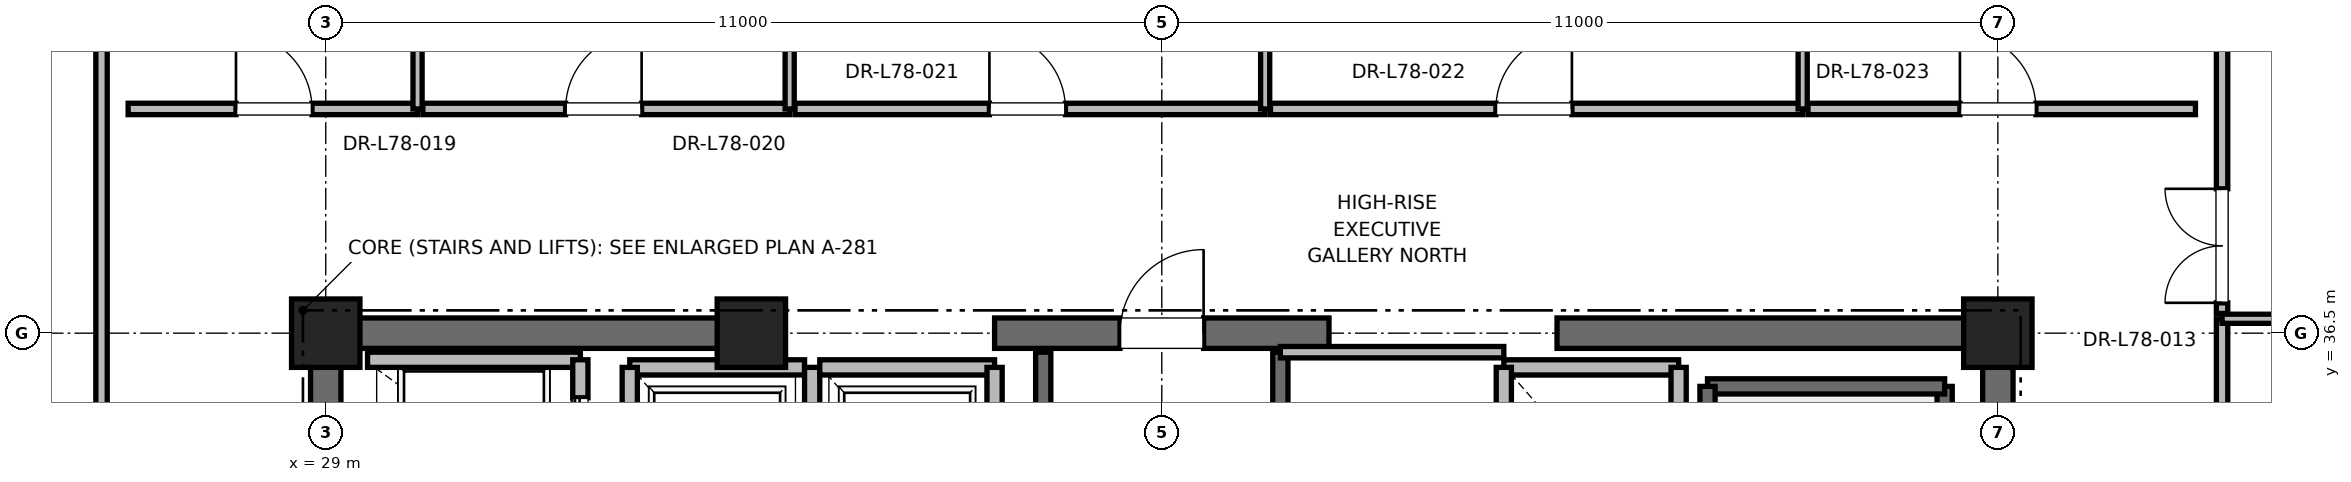
"""IFC4 building model, lengths in metres.
Left out: names, types, materials, properties, quantities, classifications, styles, units other than length and angle.
Written with IfcOpenShell. Run it as: python <this file> out.ifc"""

import sys

from ifc_helpers import new_model, si_unit, direction, frame, frame_2d, origin, origin_2d, place, context, subcontext, project, spatial, rectangle, extrude, element, fill, save


model = new_model("IFC4")
c1 = context("Model", 3, precision=1e-05, world=origin(), true_north=direction((0.0, 1.0)))
c2 = subcontext(c1, "Body", "Model", "MODEL_VIEW")
j1 = project(units=[si_unit("LENGTHUNIT", "METRE"), si_unit("PLANEANGLEUNIT", "RADIAN")], contexts=[c1])
p1 = place(None, origin())
s1 = spatial("IfcSite", under=j1, at=p1, CompositionType="ELEMENT")
p2 = place(p1, origin())
s2 = spatial("IfcBuilding", under=s1, at=p2, CompositionType="ELEMENT")
p3 = place(p2, frame((0.0, 0.0, 334.8)))
s3 = spatial("IfcBuildingStorey", under=s2, at=p3, CompositionType="ELEMENT", Elevation=334.8)
for number, where, z_axis, x_axis in (
    (1, (29.0, 36.5, 0.0), (0.0, 0.0, 1.0), (1.0, 0.0, 0.0)),
    (2, (51.0, 36.5, 0.0), (0.0, 0.0, 1.0), (1.0, 0.0, 0.0)),
    (3, (34.6, 36.5, 0.0), (0.0, 0.0, 1.0), (1.0, 0.0, 0.0)),
):
    element("IfcColumn", number, at=place(p3, frame(where, z_axis=z_axis, x_axis=x_axis)), inside=s3, PredefinedType="PILASTER", context=c2, shape_type="SweptSolid", body=[
        extrude(rectangle(XDim=0.9, YDim=0.9, at=origin_2d()), origin(), (0.0, 0.0, 1.0), 4.0),
    ])
p4 = place(p3, frame((29.0, 36.5, 0.0), z_axis=(0.0, 0.0, 1.0), x_axis=(1.0, 0.0, 0.0)))
e4 = element("IfcWall", 4, at=p4, inside=s3, PredefinedType="SHEAR", context=c2, shape_type="SweptSolid", body=[
    extrude(rectangle(XDim=5.8, YDim=0.4, at=frame_2d((2.9, 0.0))), origin(), (0.0, 0.0, 1.0), 3.785),
])
p5 = place(p3, frame((37.8, 36.5, 0.0), z_axis=(0.0, 0.0, 1.0), x_axis=(1.0, 0.0, 0.0)))
e5 = element("IfcWall", 5, at=p5, inside=s3, PredefinedType="SHEAR", context=c2, shape_type="SweptSolid", body=[
    extrude(rectangle(XDim=4.4, YDim=0.4, at=frame_2d((2.2, 0.0))), origin(), (0.0, 0.0, 1.0), 3.785),
])
p6 = place(p5, frame((1.65, 0.0, 0.0)))
e6 = element("IfcOpeningElement", 6, at=p6, cuts=e5, PredefinedType="OPENING", context=c2, shape_type="SweptSolid", body=[
    extrude(rectangle(XDim=1.1, YDim=2.15, at=frame_2d((0.55, 1.075))), frame((0.0, 0.2, 0.0), z_axis=(0.0, -1.0, 0.0), x_axis=(1.0, 0.0, 0.0)), (0.0, 0.0, 1.0), 0.4),
])
for number, where, z_axis, x_axis in (
    (7, (45.2, 36.5, 0.0), (0.0, 0.0, 1.0), (1.0, 0.0, 0.0)),
    (8, (29.0, 30.7, 0.0), (0.0, 0.0, 1.0), (0.0, 1.0, 0.0)),
):
    element("IfcWall", number, at=place(p3, frame(where, z_axis=z_axis, x_axis=x_axis)), inside=s3, PredefinedType="SHEAR", context=c2, shape_type="SweptSolid", body=[
        extrude(rectangle(XDim=5.8, YDim=0.4, at=frame_2d((2.9, 0.0))), origin(), (0.0, 0.0, 1.0), 3.785),
    ])
p7 = place(p3, frame((51.0, 27.7, 0.0), z_axis=(0.0, 0.0, 1.0), x_axis=(0.0, 1.0, 0.0)))
e9 = element("IfcWall", 9, at=p7, inside=s3, PredefinedType="SHEAR", context=c2, shape_type="SweptSolid", body=[
    extrude(rectangle(XDim=8.8, YDim=0.4, at=frame_2d((4.4, 0.0))), origin(), (0.0, 0.0, 1.0), 3.785),
])
p8 = place(p3, frame((50.3, 27.65, 0.0), z_axis=(0.0, 0.0, 1.0), x_axis=(0.0, 1.0, 0.0)))
e10 = element("IfcWall", 10, at=p8, inside=s3, PredefinedType="SOLIDWALL", context=c2, shape_type="SweptSolid", body=[
    extrude(rectangle(XDim=8.15, YDim=0.2, at=frame_2d((4.075, 0.0))), origin(), (0.0, 0.0, 1.0), 3.785),
])
p9 = place(p3, frame((47.18, 35.8, 0.0), z_axis=(0.0, 0.0, 1.0), x_axis=(1.0, 0.0, 0.0)))
e11 = element("IfcWall", 11, at=p9, inside=s3, PredefinedType="SOLIDWALL", context=c2, shape_type="SweptSolid", body=[
    extrude(rectangle(XDim=3.12, YDim=0.2, at=frame_2d((1.56, 0.0))), origin(), (0.0, 0.0, 1.0), 3.785),
])
p10 = place(p3, frame((47.18, 27.62, 0.0), z_axis=(0.0, 0.0, 1.0), x_axis=(0.0, 1.0, 0.0)))
e12 = element("IfcWall", 12, at=p10, inside=s3, PredefinedType="SOLIDWALL", context=c2, shape_type="SweptSolid", body=[
    extrude(rectangle(XDim=8.18, YDim=0.2, at=frame_2d((4.09, 0.0))), origin(), (0.0, 0.0, 1.0), 3.785),
])
p11 = place(p3, frame((38.44, 27.38, 0.0), z_axis=(0.0, 0.0, 1.0), x_axis=(0.0, 1.0, 0.0)))
e13 = element("IfcWall", 13, at=p11, inside=s3, PredefinedType="SOLIDWALL", context=c2, shape_type="SweptSolid", body=[
    extrude(rectangle(XDim=8.87, YDim=0.2, at=frame_2d((4.435, 0.0))), origin(), (0.0, 0.0, 1.0), 3.785),
])
p12 = place(p3, frame((41.56, 27.68, 0.0), z_axis=(0.0, 0.0, 1.0), x_axis=(0.0, 1.0, 0.0)))
e14 = element("IfcWall", 14, at=p12, inside=s3, PredefinedType="SOLIDWALL", context=c2, shape_type="SweptSolid", body=[
    extrude(rectangle(XDim=8.57, YDim=0.2, at=frame_2d((4.285, 0.0))), origin(), (0.0, 0.0, 1.0), 3.785),
])
p13 = place(p3, frame((32.35, 36.15, 0.0), z_axis=(0.0, 0.0, 1.0), x_axis=(-1.0, 0.0, 0.0)))
e15 = element("IfcWall", 15, at=p13, inside=s3, PredefinedType="SOLIDWALL", context=c2, shape_type="SweptSolid", body=[
    extrude(rectangle(XDim=2.8, YDim=0.2, at=frame_2d((1.4, 0.0))), origin(), (0.0, 0.0, 1.0), 3.22),
])
p14 = place(p3, frame((32.35, 34.05, 0.0), z_axis=(0.0, 0.0, 1.0), x_axis=(0.0, 1.0, 0.0)))
e16 = element("IfcWall", 16, at=p14, inside=s3, PredefinedType="SOLIDWALL", context=c2, shape_type="SweptSolid", body=[
    extrude(rectangle(XDim=2.1, YDim=0.2, at=frame_2d((1.05, 0.0))), origin(), (0.0, 0.0, 1.0), 3.785),
])
p15 = place(p14, frame((0.5, 0.0, 0.0)))
e17 = element("IfcOpeningElement", 17, at=p15, cuts=e16, PredefinedType="OPENING", context=c2, shape_type="SweptSolid", body=[
    extrude(rectangle(XDim=1.1, YDim=2.2, at=frame_2d((0.55, 1.1))), frame((0.0, 0.1, 0.0), z_axis=(0.0, -1.0, 0.0), x_axis=(1.0, 0.0, 0.0)), (0.0, 0.0, 1.0), 0.2),
])
p16 = place(p3, frame((35.3, 36.05, 0.0), z_axis=(0.0, 0.0, 1.0), x_axis=(-1.0, 0.0, 0.0)))
e18 = element("IfcWall", 18, at=p16, inside=s3, PredefinedType="SOLIDWALL", context=c2, shape_type="SweptSolid", body=[
    extrude(rectangle(XDim=2.3, YDim=0.2, at=frame_2d((1.15, 0.0))), origin(), (0.0, 0.0, 1.0), 2.865),
])
p17 = place(p3, frame((33.0, 36.05, 0.0), z_axis=(0.0, 0.0, 1.0), x_axis=(0.0, -1.0, 0.0)))
e19 = element("IfcWall", 19, at=p17, inside=s3, PredefinedType="SOLIDWALL", context=c2, shape_type="SweptSolid", body=[
    extrude(rectangle(XDim=2.6, YDim=0.2, at=frame_2d((1.3, 0.0))), origin(), (0.0, 0.0, 1.0), 3.785),
])
p18 = place(p3, frame((35.4, 33.45, 0.0), z_axis=(0.0, 0.0, 1.0), x_axis=(0.0, 1.0, 0.0)))
e20 = element("IfcWall", 20, at=p18, inside=s3, PredefinedType="SOLIDWALL", context=c2, shape_type="SweptSolid", body=[
    extrude(rectangle(XDim=2.6, YDim=0.2, at=frame_2d((1.3, 0.0))), origin(), (0.0, 0.0, 1.0), 2.865),
])
p19 = place(p3, frame((37.8, 36.05, 0.0), z_axis=(0.0, 0.0, 1.0), x_axis=(-1.0, 0.0, 0.0)))
e21 = element("IfcWall", 21, at=p19, inside=s3, PredefinedType="SOLIDWALL", context=c2, shape_type="SweptSolid", body=[
    extrude(rectangle(XDim=2.3, YDim=0.2, at=frame_2d((1.15, 0.0))), origin(), (0.0, 0.0, 1.0), 2.865),
])
p20 = place(p3, frame((37.8, 33.45, 0.0), z_axis=(0.0, 0.0, 1.0), x_axis=(0.0, 1.0, 0.0)))
e22 = element("IfcWall", 22, at=p20, inside=s3, PredefinedType="SOLIDWALL", context=c2, shape_type="SweptSolid", body=[
    extrude(rectangle(XDim=2.6, YDim=0.2, at=frame_2d((1.3, 0.0))), origin(), (0.0, 0.0, 1.0), 2.865),
])
p21 = place(p3, frame((46.8, 36.05, 0.0), z_axis=(0.0, 0.0, 1.0), x_axis=(-1.0, 0.0, 0.0)))
e23 = element("IfcWall", 23, at=p21, inside=s3, PredefinedType="SOLIDWALL", context=c2, shape_type="SweptSolid", body=[
    extrude(rectangle(XDim=2.3, YDim=0.2, at=frame_2d((1.15, 0.0))), origin(), (0.0, 0.0, 1.0), 2.865),
])
p22 = place(p3, frame((44.5, 36.05, 0.0), z_axis=(0.0, 0.0, 1.0), x_axis=(0.0, -1.0, 0.0)))
e24 = element("IfcWall", 24, at=p22, inside=s3, PredefinedType="SOLIDWALL", context=c2, shape_type="SweptSolid", body=[
    extrude(rectangle(XDim=2.6, YDim=0.2, at=frame_2d((1.3, 0.0))), origin(), (0.0, 0.0, 1.0), 2.865),
])
p23 = place(p3, frame((46.8, 33.45, 0.0), z_axis=(0.0, 0.0, 1.0), x_axis=(0.0, 1.0, 0.0)))
e25 = element("IfcWall", 25, at=p23, inside=s3, PredefinedType="SOLIDWALL", context=c2, shape_type="SweptSolid", body=[
    extrude(rectangle(XDim=2.6, YDim=0.2, at=frame_2d((1.3, 0.0))), origin(), (0.0, 0.0, 1.0), 3.785),
])
p24 = place(p3, frame((41.56, 36.25, 0.0), z_axis=(0.0, 0.0, 1.0), x_axis=(1.0, 0.0, 0.0)))
e26 = element("IfcWall", 26, at=p24, inside=s3, PredefinedType="PARTITIONING", context=c2, shape_type="SweptSolid", body=[
    extrude(rectangle(XDim=2.94, YDim=0.15, at=frame_2d((1.47, 0.0))), origin(), (0.0, 0.0, 1.0), 2.85),
])
p25 = place(p3, frame((26.4, 39.45, 0.0), z_axis=(0.0, 0.0, 1.0), x_axis=(1.0, 0.0, 0.0)))
e27 = element("IfcWall", 27, at=p25, inside=s3, PredefinedType="PARTITIONING", context=c2, shape_type="SweptSolid", body=[
    extrude(rectangle(XDim=3.808, YDim=0.15, at=frame_2d((1.904, 0.0))), origin(), (0.0, 0.0, 1.0), 2.85),
])
p26 = place(p25, frame((1.419, 0.0, 0.0)))
e28 = element("IfcOpeningElement", 28, at=p26, cuts=e27, PredefinedType="OPENING", context=c2, shape_type="SweptSolid", body=[
    extrude(rectangle(XDim=1.0, YDim=2.15, at=frame_2d((0.5, 1.075))), frame((0.0, 0.075, 0.0), z_axis=(0.0, -1.0, 0.0), x_axis=(1.0, 0.0, 0.0)), (0.0, 0.0, 1.0), 0.15),
])
p27 = place(p3, frame((30.208, 39.45, 0.0), z_axis=(0.0, 0.0, 1.0), x_axis=(0.0, 1.0, 0.0)))
e29 = element("IfcWall", 29, at=p27, inside=s3, PredefinedType="PARTITIONING", context=c2, shape_type="SweptSolid", body=[
    extrude(rectangle(XDim=9.322, YDim=0.12, at=frame_2d((4.661, 0.0))), origin(), (0.0, 0.0, 1.0), 2.415),
])
p28 = place(p3, frame((30.278, 39.45, 0.0), z_axis=(0.0, 0.0, 1.0), x_axis=(1.0, 0.0, 0.0)))
e30 = element("IfcWall", 30, at=p28, inside=s3, PredefinedType="PARTITIONING", context=c2, shape_type="SweptSolid", body=[
    extrude(rectangle(XDim=4.826, YDim=0.15, at=frame_2d((2.413, 0.0))), origin(), (0.0, 0.0, 1.0), 2.85),
])
p29 = place(p28, frame((1.878, 0.0, 0.0)))
e31 = element("IfcOpeningElement", 31, at=p29, cuts=e30, PredefinedType="OPENING", context=c2, shape_type="SweptSolid", body=[
    extrude(rectangle(XDim=1.0, YDim=2.15, at=frame_2d((0.5, 1.075))), frame((0.0, 0.075, 0.0), z_axis=(0.0, -1.0, 0.0), x_axis=(1.0, 0.0, 0.0)), (0.0, 0.0, 1.0), 0.15),
])
p30 = place(p3, frame((35.104, 39.45, 0.0), z_axis=(0.0, 0.0, 1.0), x_axis=(0.0, 1.0, 0.0)))
e32 = element("IfcWall", 32, at=p30, inside=s3, PredefinedType="PARTITIONING", context=c2, shape_type="SweptSolid", body=[
    extrude(rectangle(XDim=9.322, YDim=0.12, at=frame_2d((4.661, 0.0))), origin(), (0.0, 0.0, 1.0), 2.415),
])
p31 = place(p3, frame((35.174, 39.45, 0.0), z_axis=(0.0, 0.0, 1.0), x_axis=(1.0, 0.0, 0.0)))
e33 = element("IfcWall", 33, at=p31, inside=s3, PredefinedType="PARTITIONING", context=c2, shape_type="SweptSolid", body=[
    extrude(rectangle(XDim=6.186, YDim=0.15, at=frame_2d((3.093, 0.0))), origin(), (0.0, 0.0, 1.0), 2.85),
])
p32 = place(p31, frame((2.558, 0.0, 0.0)))
e34 = element("IfcOpeningElement", 34, at=p32, cuts=e33, PredefinedType="OPENING", context=c2, shape_type="SweptSolid", body=[
    extrude(rectangle(XDim=1.0, YDim=2.15, at=frame_2d((0.5, 1.075))), frame((0.0, 0.075, 0.0), z_axis=(0.0, -1.0, 0.0), x_axis=(1.0, 0.0, 0.0)), (0.0, 0.0, 1.0), 0.15),
])
p33 = place(p3, frame((41.36, 39.45, 0.0), z_axis=(0.0, 0.0, 1.0), x_axis=(0.0, 1.0, 0.0)))
e35 = element("IfcWall", 35, at=p33, inside=s3, PredefinedType="PARTITIONING", context=c2, shape_type="SweptSolid", body=[
    extrude(rectangle(XDim=9.322, YDim=0.12, at=frame_2d((4.661, 0.0))), origin(), (0.0, 0.0, 1.0), 2.415),
])
p34 = place(p3, frame((41.43, 39.45, 0.0), z_axis=(0.0, 0.0, 1.0), x_axis=(1.0, 0.0, 0.0)))
e36 = element("IfcWall", 36, at=p34, inside=s3, PredefinedType="PARTITIONING", context=c2, shape_type="SweptSolid", body=[
    extrude(rectangle(XDim=7.002, YDim=0.15, at=frame_2d((3.501, 0.0))), origin(), (0.0, 0.0, 1.0), 2.85),
])
p35 = place(p34, frame((2.966, 0.0, 0.0)))
e37 = element("IfcOpeningElement", 37, at=p35, cuts=e36, PredefinedType="OPENING", context=c2, shape_type="SweptSolid", body=[
    extrude(rectangle(XDim=1.0, YDim=2.15, at=frame_2d((0.5, 1.075))), frame((0.0, 0.075, 0.0), z_axis=(0.0, -1.0, 0.0), x_axis=(1.0, 0.0, 0.0)), (0.0, 0.0, 1.0), 0.15),
])
p36 = place(p3, frame((48.432, 39.45, 0.0), z_axis=(0.0, 0.0, 1.0), x_axis=(0.0, 1.0, 0.0)))
e38 = element("IfcWall", 38, at=p36, inside=s3, PredefinedType="PARTITIONING", context=c2, shape_type="SweptSolid", body=[
    extrude(rectangle(XDim=9.322, YDim=0.12, at=frame_2d((4.661, 0.0))), origin(), (0.0, 0.0, 1.0), 2.415),
])
p37 = place(p3, frame((48.502, 39.45, 0.0), z_axis=(0.0, 0.0, 1.0), x_axis=(1.0, 0.0, 0.0)))
e39 = element("IfcWall", 39, at=p37, inside=s3, PredefinedType="PARTITIONING", context=c2, shape_type="SweptSolid", body=[
    extrude(rectangle(XDim=5.098, YDim=0.15, at=frame_2d((2.549, 0.0))), origin(), (0.0, 0.0, 1.0), 2.85),
])
p38 = place(p37, frame((1.999, 0.0, 0.0)))
e40 = element("IfcOpeningElement", 40, at=p38, cuts=e39, PredefinedType="OPENING", context=c2, shape_type="SweptSolid", body=[
    extrude(rectangle(XDim=1.0, YDim=2.15, at=frame_2d((0.5, 1.075))), frame((0.0, 0.075, 0.0), z_axis=(0.0, -1.0, 0.0), x_axis=(1.0, 0.0, 0.0)), (0.0, 0.0, 1.0), 0.15),
])
p39 = place(p3, frame((26.05, 33.225, 0.0), z_axis=(0.0, 0.0, 1.0), x_axis=(0.0, 1.0, 0.0)))
e41 = element("IfcWall", 41, at=p39, inside=s3, PredefinedType="PARTITIONING", context=c2, shape_type="SweptSolid", body=[
    extrude(rectangle(XDim=11.947, YDim=0.15, at=frame_2d((5.974, 0.0))), origin(), (0.0, 0.0, 1.0), 2.85),
])
p40 = place(p39, frame((1.087, 0.0, 0.0)))
e42 = element("IfcOpeningElement", 42, at=p40, cuts=e41, PredefinedType="OPENING", context=c2, shape_type="SweptSolid", body=[
    extrude(rectangle(XDim=1.0, YDim=2.15, at=frame_2d((0.5, 1.075))), frame((0.0, 0.075, 0.0), z_axis=(0.0, -1.0, 0.0), x_axis=(1.0, 0.0, 0.0)), (0.0, 0.0, 1.0), 0.15),
])
p41 = place(p3, frame((53.95, 23.329, 0.0), z_axis=(0.0, 0.0, 1.0), x_axis=(0.0, 1.0, 0.0)))
e43 = element("IfcWall", 43, at=p41, inside=s3, PredefinedType="PARTITIONING", context=c2, shape_type="SweptSolid", body=[
    extrude(rectangle(XDim=13.361, YDim=0.15, at=frame_2d((6.68, 0.0))), origin(), (0.0, 0.0, 1.0), 2.85),
])
p42 = place(p41, frame((6.011, 0.0, 0.0)))
e44 = element("IfcOpeningElement", 44, at=p42, cuts=e43, PredefinedType="OPENING", context=c2, shape_type="SweptSolid", body=[
    extrude(rectangle(XDim=1.05, YDim=2.2, at=frame_2d((0.525, 1.1))), frame((0.0, 0.075, 0.0), z_axis=(0.0, -1.0, 0.0), x_axis=(1.0, 0.0, 0.0)), (0.0, 0.0, 1.0), 0.15),
])
p43 = place(p3, frame((53.95, 36.689, 0.0), z_axis=(0.0, 0.0, 1.0), x_axis=(1.0, 0.0, 0.0)))
e45 = element("IfcWall", 45, at=p43, inside=s3, PredefinedType="PARTITIONING", context=c2, shape_type="SweptSolid", body=[
    extrude(rectangle(XDim=10.294, YDim=0.12, at=frame_2d((5.147, 0.0))), origin(), (0.0, 0.0, 1.0), 2.85),
])
p44 = place(p3, frame((53.95, 36.76, 0.0), z_axis=(0.0, 0.0, 1.0), x_axis=(0.0, 1.0, 0.0)))
e46 = element("IfcWall", 46, at=p44, inside=s3, PredefinedType="PARTITIONING", context=c2, shape_type="SweptSolid", body=[
    extrude(rectangle(XDim=8.413, YDim=0.15, at=frame_2d((4.206, 0.0))), origin(), (0.0, 0.0, 1.0), 2.85),
])
p45 = place(p44, frame((0.14, 0.0, 0.0)))
e47 = element("IfcOpeningElement", 47, at=p45, cuts=e46, PredefinedType="OPENING", context=c2, shape_type="SweptSolid", body=[
    extrude(rectangle(XDim=1.5, YDim=2.25, at=frame_2d((0.75, 1.125))), frame((0.0, 0.075, 0.0), z_axis=(0.0, -1.0, 0.0), x_axis=(1.0, 0.0, 0.0)), (0.0, 0.0, 1.0), 0.15),
])
p46 = place(p6, origin())
e48 = element("IfcDoor", 48, at=p46, inside=s3, OperationType="SINGLE_SWING_RIGHT", PredefinedType="DOOR", context=c2, shape_type="SweptSolid", body=[
    extrude(rectangle(XDim=1.1, YDim=2.15, at=frame_2d((0.55, 1.075))), frame((0.0, 0.025, 0.0), z_axis=(0.0, -1.0, 0.0), x_axis=(1.0, 0.0, 0.0)), (0.0, 0.0, 1.0), 0.05),
])
fill(e6, e48)
p47 = place(p15, origin())
e49 = element("IfcDoor", 49, at=p47, inside=s3, OperationType="SLIDING_TO_RIGHT", PredefinedType="DOOR", context=c2, shape_type="SweptSolid", body=[
    extrude(rectangle(XDim=1.1, YDim=2.2, at=frame_2d((0.55, 1.1))), frame((0.0, 0.025, 0.0), z_axis=(0.0, -1.0, 0.0), x_axis=(1.0, 0.0, 0.0)), (0.0, 0.0, 1.0), 0.05),
])
fill(e17, e49)
p48 = place(p26, origin())
e50 = element("IfcDoor", 50, at=p48, inside=s3, OperationType="SINGLE_SWING_LEFT", PredefinedType="DOOR", context=c2, shape_type="SweptSolid", body=[
    extrude(rectangle(XDim=1.0, YDim=2.15, at=frame_2d((0.5, 1.075))), frame((0.0, 0.025, 0.0), z_axis=(0.0, -1.0, 0.0), x_axis=(1.0, 0.0, 0.0)), (0.0, 0.0, 1.0), 0.05),
])
fill(e28, e50)
p49 = place(p29, origin())
e51 = element("IfcDoor", 51, at=p49, inside=s3, OperationType="SINGLE_SWING_RIGHT", PredefinedType="DOOR", context=c2, shape_type="SweptSolid", body=[
    extrude(rectangle(XDim=1.0, YDim=2.15, at=frame_2d((0.5, 1.075))), frame((0.0, 0.025, 0.0), z_axis=(0.0, -1.0, 0.0), x_axis=(1.0, 0.0, 0.0)), (0.0, 0.0, 1.0), 0.05),
])
fill(e31, e51)
p50 = place(p32, origin())
e52 = element("IfcDoor", 52, at=p50, inside=s3, OperationType="SINGLE_SWING_LEFT", PredefinedType="DOOR", context=c2, shape_type="SweptSolid", body=[
    extrude(rectangle(XDim=1.0, YDim=2.15, at=frame_2d((0.5, 1.075))), frame((0.0, 0.025, 0.0), z_axis=(0.0, -1.0, 0.0), x_axis=(1.0, 0.0, 0.0)), (0.0, 0.0, 1.0), 0.05),
])
fill(e34, e52)
p51 = place(p35, origin())
e53 = element("IfcDoor", 53, at=p51, inside=s3, OperationType="SINGLE_SWING_RIGHT", PredefinedType="DOOR", context=c2, shape_type="SweptSolid", body=[
    extrude(rectangle(XDim=1.0, YDim=2.15, at=frame_2d((0.5, 1.075))), frame((0.0, 0.025, 0.0), z_axis=(0.0, -1.0, 0.0), x_axis=(1.0, 0.0, 0.0)), (0.0, 0.0, 1.0), 0.05),
])
fill(e37, e53)
p52 = place(p38, origin())
e54 = element("IfcDoor", 54, at=p52, inside=s3, OperationType="SINGLE_SWING_LEFT", PredefinedType="DOOR", context=c2, shape_type="SweptSolid", body=[
    extrude(rectangle(XDim=1.0, YDim=2.15, at=frame_2d((0.5, 1.075))), frame((0.0, 0.025, 0.0), z_axis=(0.0, -1.0, 0.0), x_axis=(1.0, 0.0, 0.0)), (0.0, 0.0, 1.0), 0.05),
])
fill(e40, e54)
p53 = place(p45, origin())
e55 = element("IfcDoor", 55, at=p53, inside=s3, OperationType="DOUBLE_DOOR_SINGLE_SWING", PredefinedType="DOOR", context=c2, shape_type="SweptSolid", body=[
    extrude(rectangle(XDim=1.5, YDim=2.25, at=frame_2d((0.75, 1.125))), frame((0.0, 0.025, 0.0), z_axis=(0.0, -1.0, 0.0), x_axis=(1.0, 0.0, 0.0)), (0.0, 0.0, 1.0), 0.05),
])
fill(e47, e55)
save(model, sys.argv[1])
